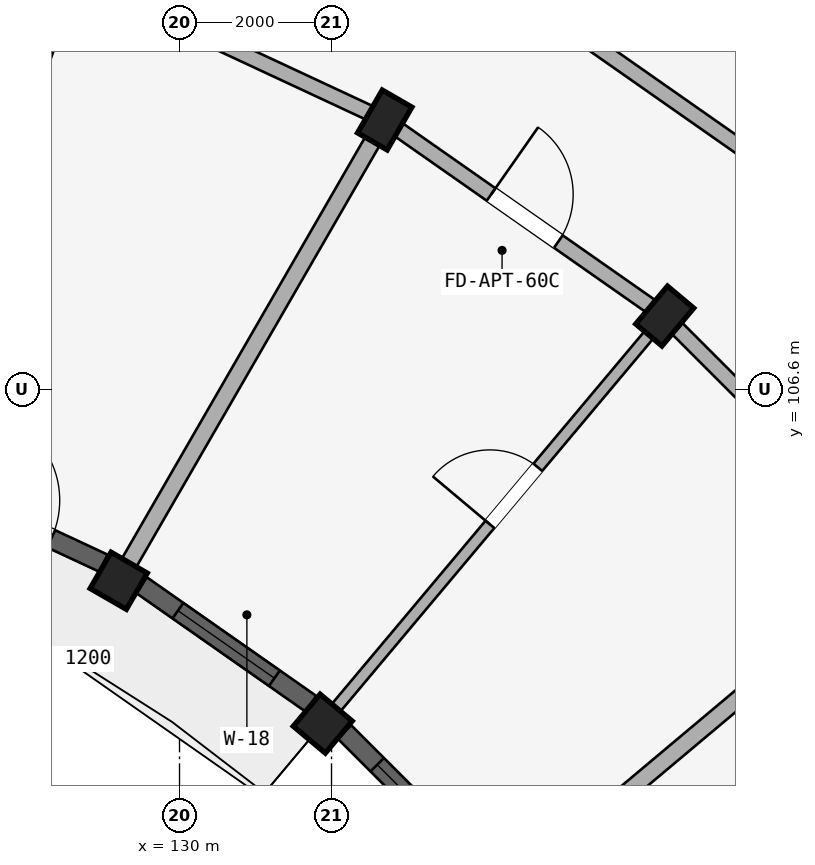
"""IFC4 building model, lengths in metres.
Left out: names, types, materials, properties, quantities, classifications, styles, units other than length and angle.
Written with IfcOpenShell. Run it as: python <this file> out.ifc"""

import sys

from ifc_helpers import new_model, si_unit, direction, frame, frame_2d, origin, origin_2d, place, context, subcontext, project, spatial, rectangle, extrude, element, fill, save


model = new_model("IFC4")
c1 = context("Model", 3, precision=1e-05, world=origin(), true_north=direction((0.0, 1.0)))
c2 = subcontext(c1, "Body", "Model", "MODEL_VIEW")
j1 = project(units=[si_unit("LENGTHUNIT", "METRE"), si_unit("PLANEANGLEUNIT", "RADIAN")], contexts=[c1])
p1 = place(None, origin())
s1 = spatial("IfcSite", under=j1, at=p1, CompositionType="ELEMENT")
p2 = place(p1, origin())
s2 = spatial("IfcBuilding", under=s1, at=p2, CompositionType="ELEMENT")
p3 = place(p2, frame((0.0, 0.0, 30.75)))
s3 = spatial("IfcBuildingStorey", under=s2, at=p3, CompositionType="ELEMENT", Elevation=30.75)
p4 = place(p3, frame((129.2, 104.081, 0.0), z_axis=(0.0, 0.0, 1.0), x_axis=(-0.866025403784, 0.5, 0.0)))
e1 = element("IfcColumn", 1, at=p4, inside=s3, PredefinedType="COLUMN", context=c2, shape_type="SweptSolid", body=[
    extrude(rectangle(XDim=0.55, YDim=0.55, at=origin_2d()), origin(), (0.0, 0.0, 1.0), 2.93),
])
p5 = place(p3, frame((132.7, 110.144, 0.0), z_axis=(0.0, 0.0, 1.0), x_axis=(-0.866025403784, 0.5, 0.0)))
e2 = element("IfcColumn", 2, at=p5, inside=s3, PredefinedType="COLUMN", context=c2, shape_type="SweptSolid", body=[
    extrude(rectangle(XDim=0.45, YDim=0.65, at=origin_2d()), origin(), (0.0, 0.0, 1.0), 2.93),
])
p6 = place(p3, frame((131.885, 102.202, 0.0), z_axis=(0.0, 0.0, 1.0), x_axis=(-0.766044443119, 0.642787609687, 0.0)))
e3 = element("IfcColumn", 3, at=p6, inside=s3, PredefinedType="COLUMN", context=c2, shape_type="SweptSolid", body=[
    extrude(rectangle(XDim=0.55, YDim=0.55, at=origin_2d()), origin(), (0.0, 0.0, 1.0), 2.93),
])
p7 = place(p3, frame((136.384, 107.564, 0.0), z_axis=(0.0, 0.0, 1.0), x_axis=(-0.766044443119, 0.642787609687, 0.0)))
e4 = element("IfcColumn", 4, at=p7, inside=s3, PredefinedType="COLUMN", context=c2, shape_type="SweptSolid", body=[
    extrude(rectangle(XDim=0.45, YDim=0.65, at=origin_2d()), origin(), (0.0, 0.0, 1.0), 2.93),
])
p8 = place(p3, frame((128.624, 112.044, 0.0), z_axis=(0.0, 0.0, 1.0), x_axis=(0.906307919131, -0.422617978463, 0.0)))
e5 = element("IfcWall", 5, at=p8, inside=s3, PredefinedType="STANDARD", context=c2, shape_type="SweptSolid", body=[
    extrude(rectangle(XDim=4.497, YDim=0.2, at=frame_2d((2.249, 0.0))), origin(), (0.0, 0.0, 1.0), 2.372),
])
p9 = place(p3, frame((132.7, 110.144, 0.0), z_axis=(0.0, 0.0, 1.0), x_axis=(0.819155404658, -0.573571637217, 0.0)))
e6 = element("IfcWall", 6, at=p9, inside=s3, PredefinedType="STANDARD", context=c2, shape_type="SweptSolid", body=[
    extrude(rectangle(XDim=4.497, YDim=0.2, at=frame_2d((2.249, 0.0))), origin(), (0.0, 0.0, 1.0), 2.372),
])
p10 = place(p9, frame((1.709, 0.0, 0.0)))
e7 = element("IfcOpeningElement", 7, at=p10, cuts=e6, PredefinedType="OPENING", context=c2, shape_type="SweptSolid", body=[
    extrude(rectangle(XDim=1.08, YDim=2.15, at=frame_2d((0.54, 1.075))), frame((0.0, 0.11, 0.0), z_axis=(0.0, -1.0, 0.0), x_axis=(1.0, 0.0, 0.0)), (0.0, 0.0, 1.0), 0.22),
])
p11 = place(p3, frame((133.9, 112.222, 0.0), z_axis=(0.0, 0.0, 1.0), x_axis=(0.819140911474, -0.573592335331, 0.0)))
e8 = element("IfcWall", 8, at=p11, inside=s3, PredefinedType="STANDARD", context=c2, shape_type="SweptSolid", body=[
    extrude(rectangle(XDim=4.916, YDim=0.2, at=frame_2d((2.458, 0.0))), origin(), (0.0, 0.0, 1.0), 2.372),
])
p12 = place(p3, frame((136.384, 107.564, 0.0), z_axis=(0.0, 0.0, 1.0), x_axis=(0.707106781187, -0.707106781187, 0.0)))
e9 = element("IfcWall", 9, at=p12, inside=s3, PredefinedType="STANDARD", context=c2, shape_type="SweptSolid", body=[
    extrude(rectangle(XDim=4.497, YDim=0.2, at=frame_2d((2.249, 0.0))), origin(), (0.0, 0.0, 1.0), 2.372),
])
p13 = place(p3, frame((126.298, 105.654, 0.0), z_axis=(0.0, 0.0, 1.0), x_axis=(0.342010221662, 0.939696231917, 0.0)))
e10 = element("IfcWall", 10, at=p13, inside=s3, PredefinedType="PARTITIONING", context=c2, shape_type="SweptSolid", body=[
    extrude(rectangle(XDim=6.75, YDim=0.15, at=frame_2d((3.375, 0.0))), origin(), (0.0, 0.0, 1.0), 2.372),
])
p14 = place(p13, frame((3.262, 0.0, 0.0)))
e11 = element("IfcOpeningElement", 11, at=p14, cuts=e10, PredefinedType="OPENING", context=c2, shape_type="SweptSolid", body=[
    extrude(rectangle(XDim=0.9, YDim=2.1, at=frame_2d((0.45, 1.05))), frame((0.0, 0.085, 0.0), z_axis=(0.0, -1.0, 0.0), x_axis=(1.0, 0.0, 0.0)), (0.0, 0.0, 1.0), 0.17),
])
p15 = place(p3, frame((129.3, 104.254, 0.0), z_axis=(0.0, 0.0, 1.0), x_axis=(0.499997969693, 0.866026575979, 0.0)))
e12 = element("IfcWall", 12, at=p15, inside=s3, PredefinedType="STANDARD", context=c2, shape_type="SweptSolid", body=[
    extrude(rectangle(XDim=6.75, YDim=0.22, at=frame_2d((3.375, 0.0))), origin(), (0.0, 0.0, 1.0), 2.372),
])
p16 = place(p3, frame((132.013, 102.355, 0.0), z_axis=(0.0, 0.0, 1.0), x_axis=(0.642784846501, 0.766046761698, 0.0)))
e13 = element("IfcWall", 13, at=p16, inside=s3, PredefinedType="PARTITIONING", context=c2, shape_type="SweptSolid", body=[
    extrude(rectangle(XDim=6.75, YDim=0.15, at=frame_2d((3.375, 0.0))), origin(), (0.0, 0.0, 1.0), 2.372),
])
p17 = place(p16, frame((3.222, 0.0, 0.0)))
e14 = element("IfcOpeningElement", 14, at=p17, cuts=e13, PredefinedType="OPENING", context=c2, shape_type="SweptSolid", body=[
    extrude(rectangle(XDim=0.98, YDim=2.12, at=frame_2d((0.49, 1.06))), frame((0.0, 0.085, 0.0), z_axis=(0.0, -1.0, 0.0), x_axis=(1.0, 0.0, 0.0)), (0.0, 0.0, 1.0), 0.17),
])
p18 = place(p3, frame((134.355, 100.013, 0.0), z_axis=(0.0, 0.0, 1.0), x_axis=(0.766046761698, 0.642784846501, 0.0)))
e15 = element("IfcWall", 15, at=p18, inside=s3, PredefinedType="STANDARD", context=c2, shape_type="SweptSolid", body=[
    extrude(rectangle(XDim=6.75, YDim=0.22, at=frame_2d((3.375, 0.0))), origin(), (0.0, 0.0, 1.0), 2.372),
])
p19 = place(p3, frame((126.535, 105.462, 0.0), z_axis=(0.0, 0.0, 1.0), x_axis=(0.906302358412, -0.422629903269, 0.0)))
e16 = element("IfcWall", 16, at=p19, inside=s3, PredefinedType="STANDARD", context=c2, shape_type="SweptSolid", body=[
    extrude(rectangle(XDim=2.72, YDim=0.25, at=frame_2d((1.36, 0.0))), origin(), (0.0, 0.0, 1.0), 2.422),
])
p20 = place(p19, frame((0.76, 0.0, 0.0)))
e17 = element("IfcOpeningElement", 17, at=p20, cuts=e16, PredefinedType="OPENING", context=c2, shape_type="SweptSolid", body=[
    extrude(rectangle(XDim=1.2, YDim=2.15, at=frame_2d((0.6, 1.075))), frame((0.0, 0.135, 0.0), z_axis=(0.0, -1.0, 0.0), x_axis=(1.0, 0.0, 0.0)), (0.0, 0.0, 1.0), 0.27),
])
p21 = place(p3, frame((129.5, 104.024, 0.0), z_axis=(0.0, 0.0, 1.0), x_axis=(0.819126475299, -0.573612950921, 0.0)))
e18 = element("IfcWall", 18, at=p21, inside=s3, PredefinedType="STANDARD", context=c2, shape_type="SweptSolid", body=[
    extrude(rectangle(XDim=2.72, YDim=0.25, at=frame_2d((1.36, 0.0))), origin(), (0.0, 0.0, 1.0), 2.422),
])
p22 = place(p21, frame((0.585, 0.0, 0.622)))
e19 = element("IfcOpeningElement", 19, at=p22, cuts=e18, PredefinedType="OPENING", context=c2, shape_type="SweptSolid", body=[
    extrude(rectangle(XDim=1.55, YDim=1.6, at=frame_2d((0.775, 0.8))), frame((0.0, 0.135, 0.0), z_axis=(0.0, -1.0, 0.0), x_axis=(1.0, 0.0, 0.0)), (0.0, 0.0, 1.0), 0.27),
])
p23 = place(p3, frame((132.17, 102.093, 0.0), z_axis=(0.0, 0.0, 1.0), x_axis=(0.707106781187, -0.707106781187, 0.0)))
e20 = element("IfcWall", 20, at=p23, inside=s3, PredefinedType="STANDARD", context=c2, shape_type="SweptSolid", body=[
    extrude(rectangle(XDim=2.72, YDim=0.25, at=frame_2d((1.36, 0.0))), origin(), (0.0, 0.0, 1.0), 2.422),
])
p24 = place(p23, frame((0.61, 0.0, 0.572)))
e21 = element("IfcOpeningElement", 21, at=p24, cuts=e20, PredefinedType="OPENING", context=c2, shape_type="SweptSolid", body=[
    extrude(rectangle(XDim=1.5, YDim=1.65, at=frame_2d((0.75, 0.825))), frame((0.0, 0.135, 0.0), z_axis=(0.0, -1.0, 0.0), x_axis=(1.0, 0.0, 0.0)), (0.0, 0.0, 1.0), 0.27),
])
p25 = place(p22, origin())
e22 = element("IfcWindow", 22, at=p25, inside=s3, PartitioningType="DOUBLE_PANEL_VERTICAL", PredefinedType="WINDOW", context=c2, shape_type="SweptSolid", body=[
    extrude(rectangle(XDim=1.55, YDim=1.6, at=frame_2d((0.775, 0.8))), frame((0.0, 0.03, 0.0), z_axis=(0.0, -1.0, 0.0), x_axis=(1.0, 0.0, 0.0)), (0.0, 0.0, 1.0), 0.06),
])
fill(e19, e22)
p26 = place(p24, origin())
e23 = element("IfcWindow", 23, at=p26, inside=s3, PartitioningType="DOUBLE_PANEL_VERTICAL", PredefinedType="WINDOW", context=c2, shape_type="SweptSolid", body=[
    extrude(rectangle(XDim=1.5, YDim=1.65, at=frame_2d((0.75, 0.825))), frame((0.0, 0.03, 0.0), z_axis=(0.0, -1.0, 0.0), x_axis=(1.0, 0.0, 0.0)), (0.0, 0.0, 1.0), 0.06),
])
fill(e21, e23)
p27 = place(p17, origin())
e24 = element("IfcDoor", 24, at=p27, inside=s3, OperationType="SINGLE_SWING_LEFT", PredefinedType="DOOR", context=c2, shape_type="SweptSolid", body=[
    extrude(rectangle(XDim=0.98, YDim=2.12, at=frame_2d((0.49, 1.06))), frame((0.0, 0.025, 0.0), z_axis=(0.0, -1.0, 0.0), x_axis=(1.0, 0.0, 0.0)), (0.0, 0.0, 1.0), 0.05),
])
fill(e14, e24)
p28 = place(p10, origin())
e25 = element("IfcDoor", 25, at=p28, inside=s3, OperationType="SINGLE_SWING_LEFT", PredefinedType="DOOR", context=c2, shape_type="SweptSolid", body=[
    extrude(rectangle(XDim=1.08, YDim=2.15, at=frame_2d((0.54, 1.075))), frame((0.0, 0.025, 0.0), z_axis=(0.0, -1.0, 0.0), x_axis=(1.0, 0.0, 0.0)), (0.0, 0.0, 1.0), 0.05),
])
fill(e7, e25)
save(model, sys.argv[1])
